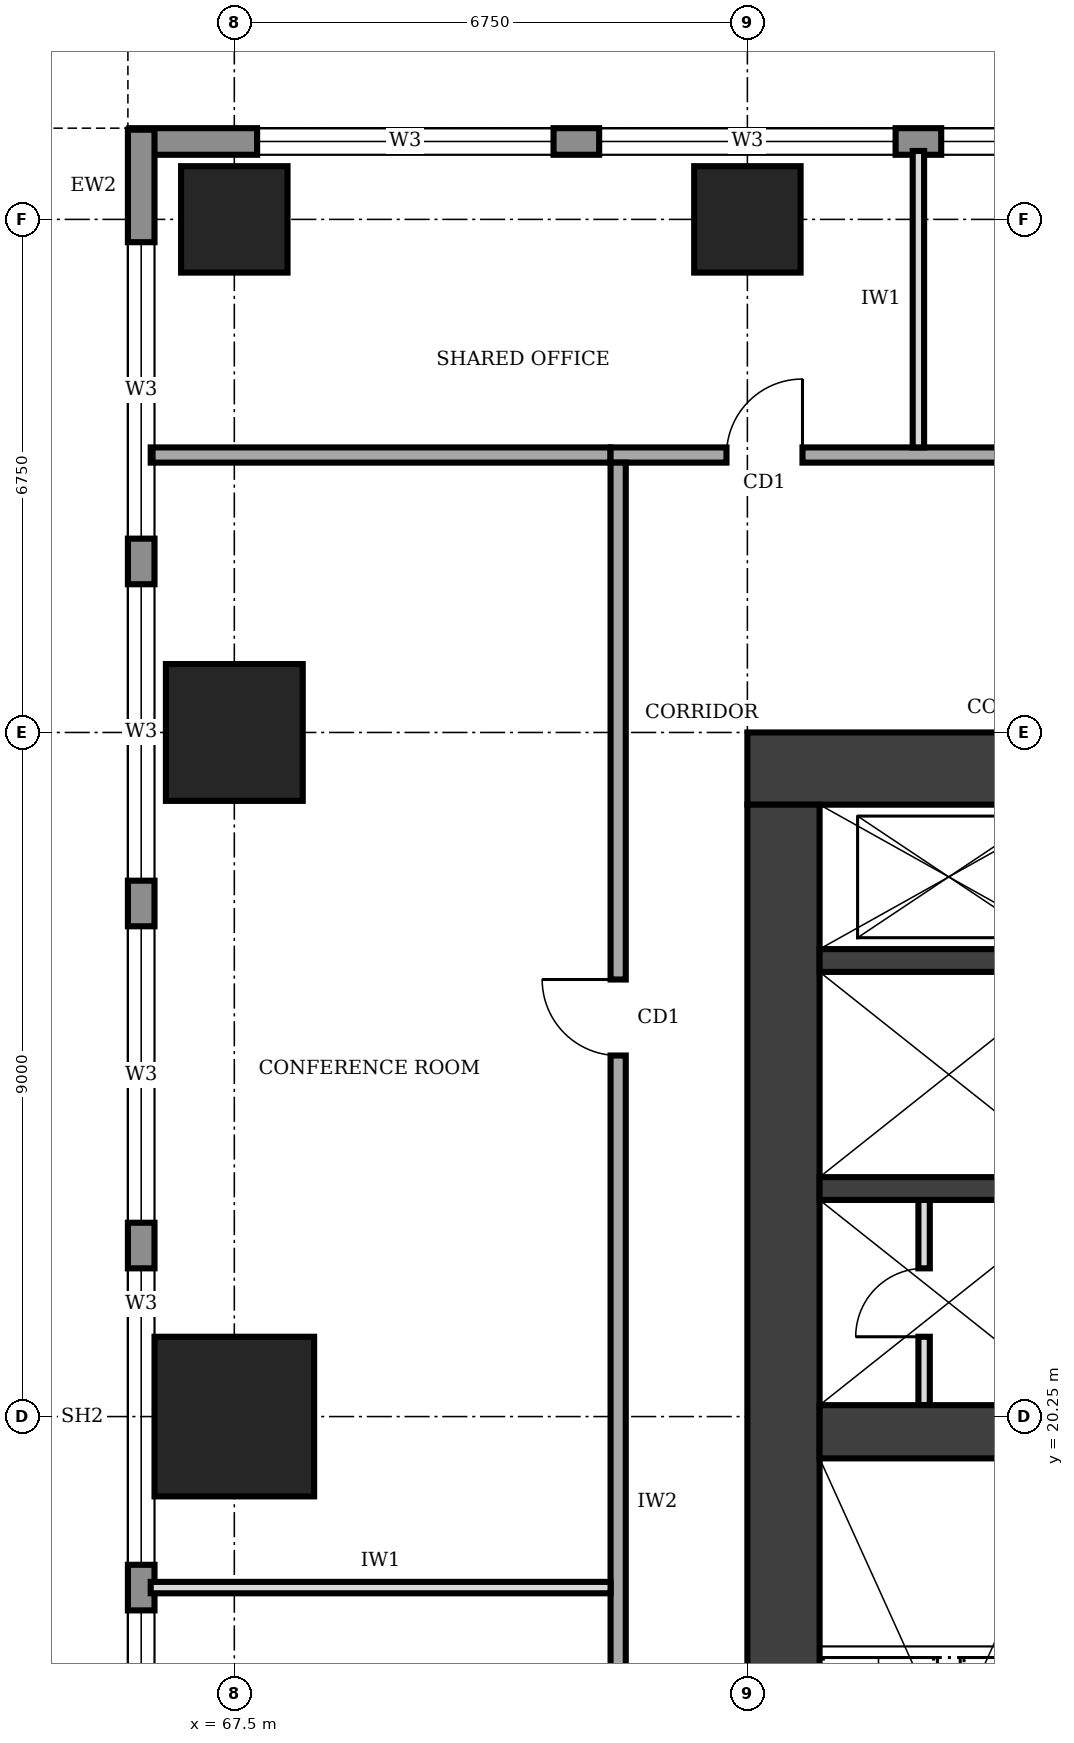
"""IFC4 building model, lengths in metres.
Left out: names, types, materials, properties, quantities, classifications, styles, units other than length and angle.
Written with IfcOpenShell. Run it as: python <this file> out.ifc"""

import sys

from ifc_helpers import new_model, si_unit, direction, frame, frame_2d, origin, origin_2d, place, context, subcontext, project, spatial, rectangle, extrude, element, fill, save


model = new_model("IFC4")
c1 = context("Model", 3, precision=1e-05, world=origin(), true_north=direction((0.0, 1.0)))
c2 = subcontext(c1, "Body", "Model", "MODEL_VIEW")
j1 = project(units=[si_unit("LENGTHUNIT", "METRE"), si_unit("PLANEANGLEUNIT", "RADIAN")], contexts=[c1])
p1 = place(None, origin())
s1 = spatial("IfcSite", under=j1, at=p1, CompositionType="ELEMENT")
p2 = place(p1, origin())
s2 = spatial("IfcBuilding", under=s1, at=p2, CompositionType="ELEMENT")
p3 = place(p2, frame((0.0, 0.0, 197.0)))
s3 = spatial("IfcBuildingStorey", under=s2, at=p3, CompositionType="ELEMENT", Elevation=197.0)
p4 = place(p3, frame((87.75, 28.775, 0.0), z_axis=(0.0, 0.0, 1.0), x_axis=(-1.0, 0.0, 0.0)))
e1 = element("IfcWall", 1, at=p4, inside=s3, PredefinedType="SHEAR", context=c2, shape_type="SweptSolid", body=[
    extrude(rectangle(XDim=13.5, YDim=0.95, at=frame_2d((6.75, 0.0))), origin(), (0.0, 0.0, 1.0), 4.0),
])
p5 = place(p4, frame((4.75, 0.0, 0.0)))
e2 = element("IfcOpeningElement", 2, at=p5, cuts=e1, PredefinedType="OPENING", context=c2, shape_type="SweptSolid", body=[
    extrude(rectangle(XDim=1.8, YDim=2.1, at=frame_2d((0.9, 1.05))), frame((0.0, 0.485, 0.0), z_axis=(0.0, -1.0, 0.0), x_axis=(1.0, 0.0, 0.0)), (0.0, 0.0, 1.0), 0.97),
])
p6 = place(p3, frame((74.725, 28.3, 0.0), z_axis=(0.0, 0.0, 1.0), x_axis=(0.0, -1.0, 0.0)))
e3 = element("IfcWall", 3, at=p6, inside=s3, PredefinedType="SHEAR", context=c2, shape_type="SweptSolid", body=[
    extrude(rectangle(XDim=16.1, YDim=0.95, at=frame_2d((8.05, 0.0))), origin(), (0.0, 0.0, 1.0), 4.0),
])
p7 = place(p3, frame((75.2, 20.05, 0.0), z_axis=(0.0, 0.0, 1.0), x_axis=(1.0, 0.0, 0.0)))
e4 = element("IfcWall", 4, at=p7, inside=s3, PredefinedType="SHEAR", context=c2, shape_type="SweptSolid", body=[
    extrude(rectangle(XDim=3.4, YDim=0.7, at=frame_2d((1.7, 0.0))), origin(), (0.0, 0.0, 1.0), 4.0),
])
for number, where, z_axis, x_axis in (
    (5, (75.2, 23.25, 0.0), (0.0, 0.0, 1.0), (1.0, 0.0, 0.0)),
    (6, (75.2, 26.25, 0.0), (0.0, 0.0, 1.0), (1.0, 0.0, 0.0)),
):
    element("IfcWall", number, at=place(p3, frame(where, z_axis=z_axis, x_axis=x_axis)), inside=s3, PredefinedType="SHEAR", context=c2, shape_type="SweptSolid", body=[
        extrude(rectangle(XDim=3.4, YDim=0.3, at=frame_2d((1.7, 0.0))), origin(), (0.0, 0.0, 1.0), 4.0),
    ])
p8 = place(p3, frame((67.5, 20.25, 0.0), z_axis=(0.0, 0.0, 1.0), x_axis=(1.0, 0.0, 0.0)))
e7 = element("IfcColumn", 7, at=p8, inside=s3, PredefinedType="COLUMN", context=c2, shape_type="SweptSolid", body=[
    extrude(rectangle(XDim=2.1, YDim=2.1, at=origin_2d()), origin(), (0.0, 0.0, 1.0), 4.0),
])
p9 = place(p3, frame((67.5, 29.25, 0.0), z_axis=(0.0, 0.0, 1.0), x_axis=(1.0, 0.0, 0.0)))
e8 = element("IfcColumn", 8, at=p9, inside=s3, PredefinedType="COLUMN", context=c2, shape_type="SweptSolid", body=[
    extrude(rectangle(XDim=1.8, YDim=1.8, at=origin_2d()), origin(), (0.0, 0.0, 1.0), 4.0),
])
for number, where, z_axis, x_axis in (
    (9, (67.5, 36.0, 0.0), (0.0, 0.0, 1.0), (1.0, 0.0, 0.0)),
    (10, (74.25, 36.0, 0.0), (0.0, 0.0, 1.0), (1.0, 0.0, 0.0)),
):
    element("IfcColumn", number, at=place(p3, frame(where, z_axis=z_axis, x_axis=x_axis)), inside=s3, PredefinedType="COLUMN", context=c2, shape_type="SweptSolid", body=[
        extrude(rectangle(XDim=1.4, YDim=1.4, at=origin_2d()), origin(), (0.0, 0.0, 1.0), 4.0),
    ])
p10 = place(p3, frame((96.03, 37.025, 0.0), z_axis=(0.0, 0.0, 1.0), x_axis=(-1.0, 0.0, 0.0)))
e11 = element("IfcWall", 11, at=p10, inside=s3, PredefinedType="STANDARD", context=c2, shape_type="SweptSolid", body=[
    extrude(rectangle(XDim=29.91, YDim=0.35, at=frame_2d((14.955, 0.0))), origin(), (0.0, 0.0, 1.0), 3.75),
])
p11 = place(p10, frame((24.33, 0.0, 0.95)))
e12 = element("IfcOpeningElement", 12, at=p11, cuts=e11, PredefinedType="OPENING", context=c2, shape_type="SweptSolid", body=[
    extrude(rectangle(XDim=3.9, YDim=1.8, at=frame_2d((1.95, 0.9))), frame((0.0, 0.185, 0.0), z_axis=(0.0, -1.0, 0.0), x_axis=(1.0, 0.0, 0.0)), (0.0, 0.0, 1.0), 0.37),
])
p12 = place(p10, frame((19.83, 0.0, 0.95)))
e13 = element("IfcOpeningElement", 13, at=p12, cuts=e11, PredefinedType="OPENING", context=c2, shape_type="SweptSolid", body=[
    extrude(rectangle(XDim=3.9, YDim=1.8, at=frame_2d((1.95, 0.9))), frame((0.0, 0.185, 0.0), z_axis=(0.0, -1.0, 0.0), x_axis=(1.0, 0.0, 0.0)), (0.0, 0.0, 1.0), 0.37),
])
p13 = place(p10, frame((15.33, 0.0, 0.95)))
e14 = element("IfcOpeningElement", 14, at=p13, cuts=e11, PredefinedType="OPENING", context=c2, shape_type="SweptSolid", body=[
    extrude(rectangle(XDim=3.9, YDim=1.8, at=frame_2d((1.95, 0.9))), frame((0.0, 0.185, 0.0), z_axis=(0.0, -1.0, 0.0), x_axis=(1.0, 0.0, 0.0)), (0.0, 0.0, 1.0), 0.37),
])
p14 = place(p10, frame((10.83, 0.0, 0.95)))
e15 = element("IfcOpeningElement", 15, at=p14, cuts=e11, PredefinedType="OPENING", context=c2, shape_type="SweptSolid", body=[
    extrude(rectangle(XDim=3.9, YDim=1.8, at=frame_2d((1.95, 0.9))), frame((0.0, 0.185, 0.0), z_axis=(0.0, -1.0, 0.0), x_axis=(1.0, 0.0, 0.0)), (0.0, 0.0, 1.0), 0.37),
])
p15 = place(p10, frame((6.33, 0.0, 0.95)))
e16 = element("IfcOpeningElement", 16, at=p15, cuts=e11, PredefinedType="OPENING", context=c2, shape_type="SweptSolid", body=[
    extrude(rectangle(XDim=3.9, YDim=1.8, at=frame_2d((1.95, 0.9))), frame((0.0, 0.185, 0.0), z_axis=(0.0, -1.0, 0.0), x_axis=(1.0, 0.0, 0.0)), (0.0, 0.0, 1.0), 0.37),
])
p16 = place(p10, frame((1.83, 0.0, 0.95)))
e17 = element("IfcOpeningElement", 17, at=p16, cuts=e11, PredefinedType="OPENING", context=c2, shape_type="SweptSolid", body=[
    extrude(rectangle(XDim=3.9, YDim=1.8, at=frame_2d((1.95, 0.9))), frame((0.0, 0.185, 0.0), z_axis=(0.0, -1.0, 0.0), x_axis=(1.0, 0.0, 0.0)), (0.0, 0.0, 1.0), 0.37),
])
p17 = place(p3, frame((66.275, 37.18, 0.0), z_axis=(0.0, 0.0, 1.0), x_axis=(0.0, -1.0, 0.0)))
e18 = element("IfcWall", 18, at=p17, inside=s3, PredefinedType="STANDARD", context=c2, shape_type="SweptSolid", body=[
    extrude(rectangle(XDim=33.86, YDim=0.35, at=frame_2d((16.93, 0.0))), origin(), (0.0, 0.0, 1.0), 3.75),
])
p18 = place(p17, frame((28.48, 0.0, 0.95)))
e19 = element("IfcOpeningElement", 19, at=p18, cuts=e18, PredefinedType="OPENING", context=c2, shape_type="SweptSolid", body=[
    extrude(rectangle(XDim=3.9, YDim=1.8, at=frame_2d((1.95, 0.9))), frame((0.0, 0.185, 0.0), z_axis=(0.0, -1.0, 0.0), x_axis=(1.0, 0.0, 0.0)), (0.0, 0.0, 1.0), 0.37),
])
p19 = place(p17, frame((23.98, 0.0, 0.95)))
e20 = element("IfcOpeningElement", 20, at=p19, cuts=e18, PredefinedType="OPENING", context=c2, shape_type="SweptSolid", body=[
    extrude(rectangle(XDim=3.9, YDim=1.8, at=frame_2d((1.95, 0.9))), frame((0.0, 0.185, 0.0), z_axis=(0.0, -1.0, 0.0), x_axis=(1.0, 0.0, 0.0)), (0.0, 0.0, 1.0), 0.37),
])
p20 = place(p17, frame((19.48, 0.0, 0.95)))
e21 = element("IfcOpeningElement", 21, at=p20, cuts=e18, PredefinedType="OPENING", context=c2, shape_type="SweptSolid", body=[
    extrude(rectangle(XDim=3.9, YDim=1.8, at=frame_2d((1.95, 0.9))), frame((0.0, 0.185, 0.0), z_axis=(0.0, -1.0, 0.0), x_axis=(1.0, 0.0, 0.0)), (0.0, 0.0, 1.0), 0.37),
])
p21 = place(p17, frame((14.98, 0.0, 0.95)))
e22 = element("IfcOpeningElement", 22, at=p21, cuts=e18, PredefinedType="OPENING", context=c2, shape_type="SweptSolid", body=[
    extrude(rectangle(XDim=3.9, YDim=1.8, at=frame_2d((1.95, 0.9))), frame((0.0, 0.185, 0.0), z_axis=(0.0, -1.0, 0.0), x_axis=(1.0, 0.0, 0.0)), (0.0, 0.0, 1.0), 0.37),
])
p22 = place(p17, frame((10.48, 0.0, 0.95)))
e23 = element("IfcOpeningElement", 23, at=p22, cuts=e18, PredefinedType="OPENING", context=c2, shape_type="SweptSolid", body=[
    extrude(rectangle(XDim=3.9, YDim=1.8, at=frame_2d((1.95, 0.9))), frame((0.0, 0.185, 0.0), z_axis=(0.0, -1.0, 0.0), x_axis=(1.0, 0.0, 0.0)), (0.0, 0.0, 1.0), 0.37),
])
p23 = place(p17, frame((5.98, 0.0, 0.95)))
e24 = element("IfcOpeningElement", 24, at=p23, cuts=e18, PredefinedType="OPENING", context=c2, shape_type="SweptSolid", body=[
    extrude(rectangle(XDim=3.9, YDim=1.8, at=frame_2d((1.95, 0.9))), frame((0.0, 0.185, 0.0), z_axis=(0.0, -1.0, 0.0), x_axis=(1.0, 0.0, 0.0)), (0.0, 0.0, 1.0), 0.37),
])
p24 = place(p17, frame((1.48, 0.0, 0.95)))
e25 = element("IfcOpeningElement", 25, at=p24, cuts=e18, PredefinedType="OPENING", context=c2, shape_type="SweptSolid", body=[
    extrude(rectangle(XDim=3.9, YDim=1.8, at=frame_2d((1.95, 0.9))), frame((0.0, 0.185, 0.0), z_axis=(0.0, -1.0, 0.0), x_axis=(1.0, 0.0, 0.0)), (0.0, 0.0, 1.0), 0.37),
])
p25 = place(p3, frame((76.575, 20.4, 0.0), z_axis=(0.0, 0.0, 1.0), x_axis=(0.0, 1.0, 0.0)))
e26 = element("IfcWall", 26, at=p25, inside=s3, PredefinedType="PARTITIONING", context=c2, shape_type="SweptSolid", body=[
    extrude(rectangle(XDim=2.7, YDim=0.15, at=frame_2d((1.35, 0.0))), origin(), (0.0, 0.0, 1.0), 3.75),
])
p26 = place(p25, frame((0.9, 0.0, 0.0)))
e27 = element("IfcOpeningElement", 27, at=p26, cuts=e26, PredefinedType="OPENING", context=c2, shape_type="SweptSolid", body=[
    extrude(rectangle(XDim=0.9, YDim=2.1, at=frame_2d((0.45, 1.05))), frame((0.0, 0.085, 0.0), z_axis=(0.0, -1.0, 0.0), x_axis=(1.0, 0.0, 0.0)), (0.0, 0.0, 1.0), 0.17),
])
p27 = place(p3, frame((89.35, 32.9, 0.0), z_axis=(0.0, 0.0, 1.0), x_axis=(-1.0, 0.0, 0.0)))
e28 = element("IfcWall", 28, at=p27, inside=s3, PredefinedType="SOLIDWALL", context=c2, shape_type="SweptSolid", body=[
    extrude(rectangle(XDim=16.9, YDim=0.2, at=frame_2d((8.45, 0.0))), origin(), (0.0, 0.0, 1.0), 3.75),
])
p28 = place(p27, frame((14.375, 0.0, 0.0)))
e29 = element("IfcOpeningElement", 29, at=p28, cuts=e28, PredefinedType="OPENING", context=c2, shape_type="SweptSolid", body=[
    extrude(rectangle(XDim=1.0, YDim=2.1, at=frame_2d((0.5, 1.05))), frame((0.0, 0.11, 0.0), z_axis=(0.0, -1.0, 0.0), x_axis=(1.0, 0.0, 0.0)), (0.0, 0.0, 1.0), 0.22),
])
p29 = place(p3, frame((72.55, 32.8, 0.0), z_axis=(0.0, 0.0, 1.0), x_axis=(0.0, -1.0, 0.0)))
e30 = element("IfcWall", 30, at=p29, inside=s3, PredefinedType="SOLIDWALL", context=c2, shape_type="SweptSolid", body=[
    extrude(rectangle(XDim=25.3, YDim=0.2, at=frame_2d((12.65, 0.0))), origin(), (0.0, 0.0, 1.0), 3.75),
])
p30 = place(p29, frame((19.55, 0.0, 0.0)))
e31 = element("IfcOpeningElement", 31, at=p30, cuts=e30, PredefinedType="OPENING", context=c2, shape_type="SweptSolid", body=[
    extrude(rectangle(XDim=1.0, YDim=2.1, at=frame_2d((0.5, 1.05))), frame((0.0, 0.11, 0.0), z_axis=(0.0, -1.0, 0.0), x_axis=(1.0, 0.0, 0.0)), (0.0, 0.0, 1.0), 0.22),
])
p31 = place(p29, frame((6.8, 0.0, 0.0)))
e32 = element("IfcOpeningElement", 32, at=p31, cuts=e30, PredefinedType="OPENING", context=c2, shape_type="SweptSolid", body=[
    extrude(rectangle(XDim=1.0, YDim=2.1, at=frame_2d((0.5, 1.05))), frame((0.0, 0.11, 0.0), z_axis=(0.0, -1.0, 0.0), x_axis=(1.0, 0.0, 0.0)), (0.0, 0.0, 1.0), 0.22),
])
p32 = place(p3, frame((66.4, 32.9, 0.0), z_axis=(0.0, 0.0, 1.0), x_axis=(1.0, 0.0, 0.0)))
e33 = element("IfcWall", 33, at=p32, inside=s3, PredefinedType="SOLIDWALL", context=c2, shape_type="SweptSolid", body=[
    extrude(rectangle(XDim=6.05, YDim=0.2, at=frame_2d((3.025, 0.0))), origin(), (0.0, 0.0, 1.0), 3.75),
])
p33 = place(p3, frame((76.5, 33.0, 0.0), z_axis=(0.0, 0.0, 1.0), x_axis=(0.0, 1.0, 0.0)))
e34 = element("IfcWall", 34, at=p33, inside=s3, PredefinedType="PARTITIONING", context=c2, shape_type="SweptSolid", body=[
    extrude(rectangle(XDim=3.9, YDim=0.15, at=frame_2d((1.95, 0.0))), origin(), (0.0, 0.0, 1.0), 3.75),
])
p34 = place(p3, frame((66.4, 18.0, 0.0), z_axis=(0.0, 0.0, 1.0), x_axis=(1.0, 0.0, 0.0)))
e35 = element("IfcWall", 35, at=p34, inside=s3, PredefinedType="PARTITIONING", context=c2, shape_type="SweptSolid", body=[
    extrude(rectangle(XDim=6.05, YDim=0.15, at=frame_2d((3.025, 0.0))), origin(), (0.0, 0.0, 1.0), 3.75),
])
p35 = place(p11, origin())
e36 = element("IfcWindow", 36, at=p35, inside=s3, PartitioningType="SINGLE_PANEL", PredefinedType="WINDOW", context=c2, shape_type="SweptSolid", body=[
    extrude(rectangle(XDim=3.9, YDim=1.8, at=frame_2d((1.95, 0.9))), frame((0.0, 0.03, 0.0), z_axis=(0.0, -1.0, 0.0), x_axis=(1.0, 0.0, 0.0)), (0.0, 0.0, 1.0), 0.06),
])
fill(e12, e36)
p36 = place(p12, origin())
e37 = element("IfcWindow", 37, at=p36, inside=s3, PartitioningType="SINGLE_PANEL", PredefinedType="WINDOW", context=c2, shape_type="SweptSolid", body=[
    extrude(rectangle(XDim=3.9, YDim=1.8, at=frame_2d((1.95, 0.9))), frame((0.0, 0.03, 0.0), z_axis=(0.0, -1.0, 0.0), x_axis=(1.0, 0.0, 0.0)), (0.0, 0.0, 1.0), 0.06),
])
fill(e13, e37)
p37 = place(p13, origin())
e38 = element("IfcWindow", 38, at=p37, inside=s3, PartitioningType="SINGLE_PANEL", PredefinedType="WINDOW", context=c2, shape_type="SweptSolid", body=[
    extrude(rectangle(XDim=3.9, YDim=1.8, at=frame_2d((1.95, 0.9))), frame((0.0, 0.03, 0.0), z_axis=(0.0, -1.0, 0.0), x_axis=(1.0, 0.0, 0.0)), (0.0, 0.0, 1.0), 0.06),
])
fill(e14, e38)
p38 = place(p20, origin())
e39 = element("IfcWindow", 39, at=p38, inside=s3, PartitioningType="SINGLE_PANEL", PredefinedType="WINDOW", context=c2, shape_type="SweptSolid", body=[
    extrude(rectangle(XDim=3.9, YDim=1.8, at=frame_2d((1.95, 0.9))), frame((0.0, 0.03, 0.0), z_axis=(0.0, -1.0, 0.0), x_axis=(1.0, 0.0, 0.0)), (0.0, 0.0, 1.0), 0.06),
])
fill(e21, e39)
p39 = place(p21, origin())
e40 = element("IfcWindow", 40, at=p39, inside=s3, PartitioningType="SINGLE_PANEL", PredefinedType="WINDOW", context=c2, shape_type="SweptSolid", body=[
    extrude(rectangle(XDim=3.9, YDim=1.8, at=frame_2d((1.95, 0.9))), frame((0.0, 0.03, 0.0), z_axis=(0.0, -1.0, 0.0), x_axis=(1.0, 0.0, 0.0)), (0.0, 0.0, 1.0), 0.06),
])
fill(e22, e40)
p40 = place(p22, origin())
e41 = element("IfcWindow", 41, at=p40, inside=s3, PartitioningType="SINGLE_PANEL", PredefinedType="WINDOW", context=c2, shape_type="SweptSolid", body=[
    extrude(rectangle(XDim=3.9, YDim=1.8, at=frame_2d((1.95, 0.9))), frame((0.0, 0.03, 0.0), z_axis=(0.0, -1.0, 0.0), x_axis=(1.0, 0.0, 0.0)), (0.0, 0.0, 1.0), 0.06),
])
fill(e23, e41)
p41 = place(p23, origin())
e42 = element("IfcWindow", 42, at=p41, inside=s3, PartitioningType="SINGLE_PANEL", PredefinedType="WINDOW", context=c2, shape_type="SweptSolid", body=[
    extrude(rectangle(XDim=3.9, YDim=1.8, at=frame_2d((1.95, 0.9))), frame((0.0, 0.03, 0.0), z_axis=(0.0, -1.0, 0.0), x_axis=(1.0, 0.0, 0.0)), (0.0, 0.0, 1.0), 0.06),
])
fill(e24, e42)
p42 = place(p24, origin())
e43 = element("IfcWindow", 43, at=p42, inside=s3, PartitioningType="SINGLE_PANEL", PredefinedType="WINDOW", context=c2, shape_type="SweptSolid", body=[
    extrude(rectangle(XDim=3.9, YDim=1.8, at=frame_2d((1.95, 0.9))), frame((0.0, 0.03, 0.0), z_axis=(0.0, -1.0, 0.0), x_axis=(1.0, 0.0, 0.0)), (0.0, 0.0, 1.0), 0.06),
])
fill(e25, e43)
p43 = place(p26, origin())
e44 = element("IfcDoor", 44, at=p43, inside=s3, OperationType="SINGLE_SWING_LEFT", PredefinedType="DOOR", context=c2, shape_type="SweptSolid", body=[
    extrude(rectangle(XDim=0.9, YDim=2.1, at=frame_2d((0.45, 1.05))), frame((0.0, 0.025, 0.0), z_axis=(0.0, -1.0, 0.0), x_axis=(1.0, 0.0, 0.0)), (0.0, 0.0, 1.0), 0.05),
])
fill(e27, e44)
p44 = place(p28, frame((1.0, 0.0, 0.0), z_axis=(0.0, 0.0, 1.0), x_axis=(-1.0, 0.0, 0.0)))
e45 = element("IfcDoor", 45, at=p44, inside=s3, OperationType="SINGLE_SWING_RIGHT", PredefinedType="DOOR", context=c2, shape_type="SweptSolid", body=[
    extrude(rectangle(XDim=1.0, YDim=2.1, at=frame_2d((0.5, 1.05))), frame((0.0, 0.025, 0.0), z_axis=(0.0, -1.0, 0.0), x_axis=(1.0, 0.0, 0.0)), (0.0, 0.0, 1.0), 0.05),
])
fill(e29, e45)
p45 = place(p31, frame((1.0, 0.0, 0.0), z_axis=(0.0, 0.0, 1.0), x_axis=(-1.0, 0.0, 0.0)))
e46 = element("IfcDoor", 46, at=p45, inside=s3, OperationType="SINGLE_SWING_RIGHT", PredefinedType="DOOR", context=c2, shape_type="SweptSolid", body=[
    extrude(rectangle(XDim=1.0, YDim=2.1, at=frame_2d((0.5, 1.05))), frame((0.0, 0.025, 0.0), z_axis=(0.0, -1.0, 0.0), x_axis=(1.0, 0.0, 0.0)), (0.0, 0.0, 1.0), 0.05),
])
fill(e32, e46)
save(model, sys.argv[1])
